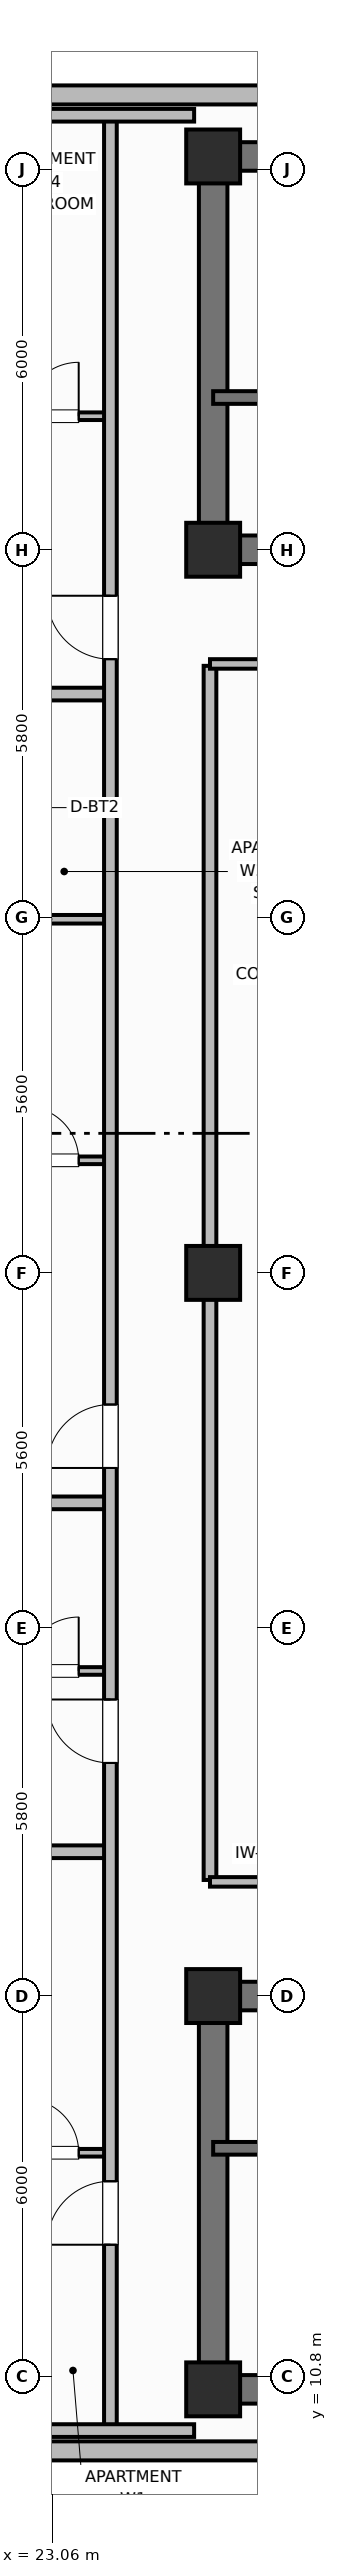
"""IFC4 building model, lengths in metres.
Left out: names, types, materials, properties, quantities, classifications, styles, units other than length and angle.
Written with IfcOpenShell. Run it as: python <this file> out.ifc"""

import sys

from ifc_helpers import new_model, si_unit, direction, frame, frame_2d, origin, origin_2d, place, context, subcontext, project, spatial, rectangle, extrude, element, fill, save


model = new_model("IFC4")
c1 = context("Model", 3, precision=1e-05, world=origin(), true_north=direction((0.0, 1.0)))
c2 = subcontext(c1, "Body", "Model", "MODEL_VIEW")
j1 = project(units=[si_unit("LENGTHUNIT", "METRE"), si_unit("PLANEANGLEUNIT", "RADIAN")], contexts=[c1])
p1 = place(None, origin())
s1 = spatial("IfcSite", under=j1, at=p1, CompositionType="ELEMENT")
p2 = place(p1, origin())
s2 = spatial("IfcBuilding", under=s1, at=p2, CompositionType="ELEMENT")
p3 = place(p2, frame((0.0, 0.0, 229.5)))
s3 = spatial("IfcBuildingStorey", under=s2, at=p3, CompositionType="ELEMENT", Elevation=229.5)
p4 = place(p3, frame((52.8, 10.6, 0.0), z_axis=(0.0, 0.0, 1.0), x_axis=(-1.0, 0.0, 0.0)))
e1 = element("IfcWall", 1, at=p4, inside=s3, PredefinedType="SHEAR", context=c2, shape_type="SweptSolid", body=[
    extrude(rectangle(XDim=27.2, YDim=0.45, at=frame_2d((13.6, 0.0))), origin(), (0.0, 0.0, 1.0), 3.7),
])
p5 = place(p3, frame((25.6, 10.825, 0.0), z_axis=(0.0, 0.0, 1.0), x_axis=(0.0, 1.0, 0.0)))
e2 = element("IfcWall", 2, at=p5, inside=s3, PredefinedType="SHEAR", context=c2, shape_type="SweptSolid", body=[
    extrude(rectangle(XDim=5.75, YDim=0.45, at=frame_2d((2.875, 0.0))), origin(), (0.0, 0.0, 1.0), 3.7),
])
p6 = place(p3, frame((25.6, 16.8, 0.0), z_axis=(0.0, 0.0, 1.0), x_axis=(1.0, 0.0, 0.0)))
e3 = element("IfcWall", 3, at=p6, inside=s3, PredefinedType="SHEAR", context=c2, shape_type="SweptSolid", body=[
    extrude(rectangle(XDim=27.2, YDim=0.45, at=frame_2d((13.6, 0.0))), origin(), (0.0, 0.0, 1.0), 3.7),
])
p7 = place(p6, frame((1.9, 0.0, 0.0)))
e4 = element("IfcOpeningElement", 4, at=p7, cuts=e3, PredefinedType="OPENING", context=c2, shape_type="SweptSolid", body=[
    extrude(rectangle(XDim=1.1, YDim=2.15, at=frame_2d((0.55, 1.075))), frame((0.0, 0.235, 0.0), z_axis=(0.0, -1.0, 0.0), x_axis=(1.0, 0.0, 0.0)), (0.0, 0.0, 1.0), 0.47),
])
p8 = place(p6, frame((13.0, 0.0, 0.0)))
e5 = element("IfcOpeningElement", 5, at=p8, cuts=e3, PredefinedType="OPENING", context=c2, shape_type="SweptSolid", body=[
    extrude(rectangle(XDim=1.2, YDim=2.15, at=frame_2d((0.6, 1.075))), frame((0.0, 0.235, 0.0), z_axis=(0.0, -1.0, 0.0), x_axis=(1.0, 0.0, 0.0)), (0.0, 0.0, 1.0), 0.47),
])
p9 = place(p6, frame((21.6, 0.0, 0.0)))
e6 = element("IfcOpeningElement", 6, at=p9, cuts=e3, PredefinedType="OPENING", context=c2, shape_type="SweptSolid", body=[
    extrude(rectangle(XDim=1.0, YDim=2.15, at=frame_2d((0.5, 1.075))), frame((0.0, 0.235, 0.0), z_axis=(0.0, -1.0, 0.0), x_axis=(1.0, 0.0, 0.0)), (0.0, 0.0, 1.0), 0.47),
])
p10 = place(p3, frame((25.6, 45.8, 0.0), z_axis=(0.0, 0.0, 1.0), x_axis=(1.0, 0.0, 0.0)))
e7 = element("IfcWall", 7, at=p10, inside=s3, PredefinedType="SHEAR", context=c2, shape_type="SweptSolid", body=[
    extrude(rectangle(XDim=27.2, YDim=0.45, at=frame_2d((13.6, 0.0))), origin(), (0.0, 0.0, 1.0), 3.7),
])
p11 = place(p3, frame((25.6, 39.825, 0.0), z_axis=(0.0, 0.0, 1.0), x_axis=(0.0, 1.0, 0.0)))
e8 = element("IfcWall", 8, at=p11, inside=s3, PredefinedType="SHEAR", context=c2, shape_type="SweptSolid", body=[
    extrude(rectangle(XDim=5.75, YDim=0.45, at=frame_2d((2.875, 0.0))), origin(), (0.0, 0.0, 1.0), 3.7),
])
p12 = place(p3, frame((52.8, 39.6, 0.0), z_axis=(0.0, 0.0, 1.0), x_axis=(-1.0, 0.0, 0.0)))
e9 = element("IfcWall", 9, at=p12, inside=s3, PredefinedType="SHEAR", context=c2, shape_type="SweptSolid", body=[
    extrude(rectangle(XDim=27.2, YDim=0.45, at=frame_2d((13.6, 0.0))), origin(), (0.0, 0.0, 1.0), 3.7),
])
p13 = place(p12, frame((24.2, 0.0, 0.0)))
e10 = element("IfcOpeningElement", 10, at=p13, cuts=e9, PredefinedType="OPENING", context=c2, shape_type="SweptSolid", body=[
    extrude(rectangle(XDim=1.1, YDim=2.15, at=frame_2d((0.55, 1.075))), frame((0.0, 0.235, 0.0), z_axis=(0.0, -1.0, 0.0), x_axis=(1.0, 0.0, 0.0)), (0.0, 0.0, 1.0), 0.47),
])
p14 = place(p12, frame((15.1, 0.0, 0.0)))
e11 = element("IfcOpeningElement", 11, at=p14, cuts=e9, PredefinedType="OPENING", context=c2, shape_type="SweptSolid", body=[
    extrude(rectangle(XDim=1.2, YDim=2.15, at=frame_2d((0.6, 1.075))), frame((0.0, 0.235, 0.0), z_axis=(0.0, -1.0, 0.0), x_axis=(1.0, 0.0, 0.0)), (0.0, 0.0, 1.0), 0.47),
])
p15 = place(p12, frame((11.6, 0.0, 0.0)))
e12 = element("IfcOpeningElement", 12, at=p15, cuts=e9, PredefinedType="OPENING", context=c2, shape_type="SweptSolid", body=[
    extrude(rectangle(XDim=0.9, YDim=2.1, at=frame_2d((0.45, 1.05))), frame((0.0, 0.235, 0.0), z_axis=(0.0, -1.0, 0.0), x_axis=(1.0, 0.0, 0.0)), (0.0, 0.0, 1.0), 0.47),
])
p16 = place(p12, frame((7.35, 0.0, 0.0)))
e13 = element("IfcOpeningElement", 13, at=p16, cuts=e9, PredefinedType="OPENING", context=c2, shape_type="SweptSolid", body=[
    extrude(rectangle(XDim=0.85, YDim=2.1, at=frame_2d((0.425, 1.05))), frame((0.0, 0.235, 0.0), z_axis=(0.0, -1.0, 0.0), x_axis=(1.0, 0.0, 0.0)), (0.0, 0.0, 1.0), 0.47),
])
p17 = place(p12, frame((4.2, 0.0, 0.0)))
e14 = element("IfcOpeningElement", 14, at=p17, cuts=e9, PredefinedType="OPENING", context=c2, shape_type="SweptSolid", body=[
    extrude(rectangle(XDim=1.3, YDim=2.2, at=frame_2d((0.65, 1.1))), frame((0.0, 0.235, 0.0), z_axis=(0.0, -1.0, 0.0), x_axis=(1.0, 0.0, 0.0)), (0.0, 0.0, 1.0), 0.47),
])
for number, where, z_axis, x_axis in (
    (15, (25.6, 10.6, 0.0), (0.0, 0.0, 1.0), (1.0, 0.0, 0.0)),
    (16, (25.6, 16.8, 0.0), (0.0, 0.0, 1.0), (1.0, 0.0, 0.0)),
    (17, (25.6, 39.6, 0.0), (0.0, 0.0, 1.0), (1.0, 0.0, 0.0)),
    (18, (25.6, 45.8, 0.0), (0.0, 0.0, 1.0), (1.0, 0.0, 0.0)),
    (19, (25.6, 28.2, 0.0), (0.0, 0.0, 1.0), (1.0, 0.0, 0.0)),
):
    element("IfcColumn", number, at=place(p3, frame(where, z_axis=z_axis, x_axis=x_axis)), inside=s3, PredefinedType="COLUMN", context=c2, shape_type="SweptSolid", body=[
        extrude(rectangle(XDim=0.85, YDim=0.85, at=origin_2d()), origin(), (0.0, 0.0, 1.0), 3.7),
    ])
p18 = place(p3, frame((22.56, 9.63, 0.0), z_axis=(0.0, 0.0, 1.0), x_axis=(1.0, 0.0, 0.0)))
e20 = element("IfcWall", 20, at=p18, inside=s3, PredefinedType="SOLIDWALL", context=c2, shape_type="SweptSolid", body=[
    extrude(rectangle(XDim=33.28, YDim=0.3, at=frame_2d((16.64, 0.0))), origin(), (0.0, 0.0, 1.0), 2.73),
])
p19 = place(p18, frame((4.747, 0.0, 0.76)))
e21 = element("IfcOpeningElement", 21, at=p19, cuts=e20, PredefinedType="OPENING", context=c2, shape_type="SweptSolid", body=[
    extrude(rectangle(XDim=1.4, YDim=1.85, at=frame_2d((0.7, 0.925))), frame((0.0, 0.16, 0.0), z_axis=(0.0, -1.0, 0.0), x_axis=(1.0, 0.0, 0.0)), (0.0, 0.0, 1.0), 0.32),
])
p20 = place(p18, frame((7.945, 0.0, 0.76)))
e22 = element("IfcOpeningElement", 22, at=p20, cuts=e20, PredefinedType="OPENING", context=c2, shape_type="SweptSolid", body=[
    extrude(rectangle(XDim=1.4, YDim=1.85, at=frame_2d((0.7, 0.925))), frame((0.0, 0.16, 0.0), z_axis=(0.0, -1.0, 0.0), x_axis=(1.0, 0.0, 0.0)), (0.0, 0.0, 1.0), 0.32),
])
p21 = place(p18, frame((14.341, 0.0, 0.76)))
e23 = element("IfcOpeningElement", 23, at=p21, cuts=e20, PredefinedType="OPENING", context=c2, shape_type="SweptSolid", body=[
    extrude(rectangle(XDim=1.4, YDim=1.85, at=frame_2d((0.7, 0.925))), frame((0.0, 0.16, 0.0), z_axis=(0.0, -1.0, 0.0), x_axis=(1.0, 0.0, 0.0)), (0.0, 0.0, 1.0), 0.32),
])
p22 = place(p18, frame((17.539, 0.0, 0.76)))
e24 = element("IfcOpeningElement", 24, at=p22, cuts=e20, PredefinedType="OPENING", context=c2, shape_type="SweptSolid", body=[
    extrude(rectangle(XDim=1.4, YDim=1.85, at=frame_2d((0.7, 0.925))), frame((0.0, 0.16, 0.0), z_axis=(0.0, -1.0, 0.0), x_axis=(1.0, 0.0, 0.0)), (0.0, 0.0, 1.0), 0.32),
])
p23 = place(p18, frame((23.935, 0.0, 0.76)))
e25 = element("IfcOpeningElement", 25, at=p23, cuts=e20, PredefinedType="OPENING", context=c2, shape_type="SweptSolid", body=[
    extrude(rectangle(XDim=1.4, YDim=1.85, at=frame_2d((0.7, 0.925))), frame((0.0, 0.16, 0.0), z_axis=(0.0, -1.0, 0.0), x_axis=(1.0, 0.0, 0.0)), (0.0, 0.0, 1.0), 0.32),
])
p24 = place(p18, frame((27.133, 0.0, 0.76)))
e26 = element("IfcOpeningElement", 26, at=p24, cuts=e20, PredefinedType="OPENING", context=c2, shape_type="SweptSolid", body=[
    extrude(rectangle(XDim=1.4, YDim=1.85, at=frame_2d((0.7, 0.925))), frame((0.0, 0.16, 0.0), z_axis=(0.0, -1.0, 0.0), x_axis=(1.0, 0.0, 0.0)), (0.0, 0.0, 1.0), 0.32),
])
p25 = place(p3, frame((55.84, 46.77, 0.0), z_axis=(0.0, 0.0, 1.0), x_axis=(-1.0, 0.0, 0.0)))
e27 = element("IfcWall", 27, at=p25, inside=s3, PredefinedType="SOLIDWALL", context=c2, shape_type="SweptSolid", body=[
    extrude(rectangle(XDim=33.28, YDim=0.3, at=frame_2d((16.64, 0.0))), origin(), (0.0, 0.0, 1.0), 2.73),
])
p26 = place(p25, frame((5.08, 0.0, 0.76)))
e28 = element("IfcOpeningElement", 28, at=p26, cuts=e27, PredefinedType="OPENING", context=c2, shape_type="SweptSolid", body=[
    extrude(rectangle(XDim=1.8, YDim=1.85, at=frame_2d((0.9, 0.925))), frame((0.0, 0.16, 0.0), z_axis=(0.0, -1.0, 0.0), x_axis=(1.0, 0.0, 0.0)), (0.0, 0.0, 1.0), 0.32),
])
p27 = place(p25, frame((8.633, 0.0, 0.76)))
e29 = element("IfcOpeningElement", 29, at=p27, cuts=e27, PredefinedType="OPENING", context=c2, shape_type="SweptSolid", body=[
    extrude(rectangle(XDim=1.8, YDim=1.85, at=frame_2d((0.9, 0.925))), frame((0.0, 0.16, 0.0), z_axis=(0.0, -1.0, 0.0), x_axis=(1.0, 0.0, 0.0)), (0.0, 0.0, 1.0), 0.32),
])
p28 = place(p25, frame((15.74, 0.0, 0.76)))
e30 = element("IfcOpeningElement", 30, at=p28, cuts=e27, PredefinedType="OPENING", context=c2, shape_type="SweptSolid", body=[
    extrude(rectangle(XDim=1.8, YDim=1.85, at=frame_2d((0.9, 0.925))), frame((0.0, 0.16, 0.0), z_axis=(0.0, -1.0, 0.0), x_axis=(1.0, 0.0, 0.0)), (0.0, 0.0, 1.0), 0.32),
])
p29 = place(p25, frame((22.847, 0.0, 0.76)))
e31 = element("IfcOpeningElement", 31, at=p29, cuts=e27, PredefinedType="OPENING", context=c2, shape_type="SweptSolid", body=[
    extrude(rectangle(XDim=1.8, YDim=1.85, at=frame_2d((0.9, 0.925))), frame((0.0, 0.16, 0.0), z_axis=(0.0, -1.0, 0.0), x_axis=(1.0, 0.0, 0.0)), (0.0, 0.0, 1.0), 0.32),
])
p30 = place(p25, frame((26.4, 0.0, 0.76)))
e32 = element("IfcOpeningElement", 32, at=p30, cuts=e27, PredefinedType="OPENING", context=c2, shape_type="SweptSolid", body=[
    extrude(rectangle(XDim=1.8, YDim=1.85, at=frame_2d((0.9, 0.925))), frame((0.0, 0.16, 0.0), z_axis=(0.0, -1.0, 0.0), x_axis=(1.0, 0.0, 0.0)), (0.0, 0.0, 1.0), 0.32),
])
p31 = place(p3, frame((25.6, 14.4, 0.0), z_axis=(0.0, 0.0, 1.0), x_axis=(1.0, 0.0, 0.0)))
e33 = element("IfcWall", 33, at=p31, inside=s3, PredefinedType="SHEAR", context=c2, shape_type="SweptSolid", body=[
    extrude(rectangle(XDim=9.55, YDim=0.2, at=frame_2d((4.775, 0.0))), origin(), (0.0, 0.0, 1.0), 3.7),
])
p32 = place(p31, frame((1.05, 0.0, 0.0)))
e34 = element("IfcOpeningElement", 34, at=p32, cuts=e33, PredefinedType="OPENING", context=c2, shape_type="SweptSolid", body=[
    extrude(rectangle(XDim=1.1, YDim=2.15, at=frame_2d((0.55, 1.075))), frame((0.0, 0.11, 0.0), z_axis=(0.0, -1.0, 0.0), x_axis=(1.0, 0.0, 0.0)), (0.0, 0.0, 1.0), 0.22),
])
p33 = place(p3, frame((35.15, 42.0, 0.0), z_axis=(0.0, 0.0, 1.0), x_axis=(-1.0, 0.0, 0.0)))
e35 = element("IfcWall", 35, at=p33, inside=s3, PredefinedType="SHEAR", context=c2, shape_type="SweptSolid", body=[
    extrude(rectangle(XDim=9.55, YDim=0.2, at=frame_2d((4.775, 0.0))), origin(), (0.0, 0.0, 1.0), 3.7),
])
p34 = place(p33, frame((7.25, 0.0, 0.0)))
e36 = element("IfcOpeningElement", 36, at=p34, cuts=e35, PredefinedType="OPENING", context=c2, shape_type="SweptSolid", body=[
    extrude(rectangle(XDim=1.1, YDim=2.15, at=frame_2d((0.55, 1.075))), frame((0.0, 0.11, 0.0), z_axis=(0.0, -1.0, 0.0), x_axis=(1.0, 0.0, 0.0)), (0.0, 0.0, 1.0), 0.22),
])
p35 = place(p3, frame((25.55, 18.63, 0.0), z_axis=(0.0, 0.0, 1.0), x_axis=(0.0, 1.0, 0.0)))
e37 = element("IfcWall", 37, at=p35, inside=s3, PredefinedType="PARTITIONING", context=c2, shape_type="SweptSolid", body=[
    extrude(rectangle(XDim=19.14, YDim=0.2, at=frame_2d((9.57, 0.0))), origin(), (0.0, 0.0, 1.0), 2.56),
])
for number, where, z_axis, x_axis in (
    (38, (25.55, 18.6, 0.0), (0.0, 0.0, 1.0), (1.0, 0.0, 0.0)),
    (39, (25.55, 37.8, 0.0), (0.0, 0.0, 1.0), (1.0, 0.0, 0.0)),
):
    element("IfcWall", number, at=place(p3, frame(where, z_axis=z_axis, x_axis=x_axis)), inside=s3, PredefinedType="PARTITIONING", context=c2, shape_type="SweptSolid", body=[
        extrude(rectangle(XDim=3.5, YDim=0.15, at=frame_2d((1.75, 0.0))), origin(), (0.0, 0.0, 1.0), 2.56),
    ])
p36 = place(p3, frame((22.03, 14.33, 0.0), z_axis=(0.0, 0.0, 1.0), x_axis=(1.0, 0.0, 0.0)))
e40 = element("IfcWall", 40, at=p36, inside=s3, PredefinedType="PARTITIONING", context=c2, shape_type="SweptSolid", body=[
    extrude(rectangle(XDim=1.95, YDim=0.12, at=frame_2d((0.975, 0.0))), origin(), (0.0, 0.0, 1.0), 2.56),
])
p37 = place(p36, frame((0.6, 0.0, 0.0)))
e41 = element("IfcOpeningElement", 41, at=p37, cuts=e40, PredefinedType="OPENING", context=c2, shape_type="SweptSolid", body=[
    extrude(rectangle(XDim=0.85, YDim=2.1, at=frame_2d((0.425, 1.05))), frame((0.0, 0.07, 0.0), z_axis=(0.0, -1.0, 0.0), x_axis=(1.0, 0.0, 0.0)), (0.0, 0.0, 1.0), 0.14),
])
p38 = place(p3, frame((19.53, 19.075, 0.0), z_axis=(0.0, 0.0, 1.0), x_axis=(1.0, 0.0, 0.0)))
e42 = element("IfcWall", 42, at=p38, inside=s3, PredefinedType="PARTITIONING", context=c2, shape_type="SweptSolid", body=[
    extrude(rectangle(XDim=4.45, YDim=0.2, at=frame_2d((2.225, 0.0))), origin(), (0.0, 0.0, 1.0), 2.56),
])
p39 = place(p3, frame((22.03, 21.925, 0.0), z_axis=(0.0, 0.0, 1.0), x_axis=(1.0, 0.0, 0.0)))
e43 = element("IfcWall", 43, at=p39, inside=s3, PredefinedType="PARTITIONING", context=c2, shape_type="SweptSolid", body=[
    extrude(rectangle(XDim=1.95, YDim=0.12, at=frame_2d((0.975, 0.0))), origin(), (0.0, 0.0, 1.0), 2.56),
])
p40 = place(p39, frame((0.6, 0.0, 0.0)))
e44 = element("IfcOpeningElement", 44, at=p40, cuts=e43, PredefinedType="OPENING", context=c2, shape_type="SweptSolid", body=[
    extrude(rectangle(XDim=0.85, YDim=2.1, at=frame_2d((0.425, 1.05))), frame((0.0, 0.07, 0.0), z_axis=(0.0, -1.0, 0.0), x_axis=(1.0, 0.0, 0.0)), (0.0, 0.0, 1.0), 0.14),
])
p41 = place(p3, frame((19.829, 24.575, 0.0), z_axis=(0.0, 0.0, 1.0), x_axis=(1.0, 0.0, 0.0)))
e45 = element("IfcWall", 45, at=p41, inside=s3, PredefinedType="PARTITIONING", context=c2, shape_type="SweptSolid", body=[
    extrude(rectangle(XDim=4.151, YDim=0.2, at=frame_2d((2.075, 0.0))), origin(), (0.0, 0.0, 1.0), 2.56),
])
p42 = place(p3, frame((22.03, 29.975, 0.0), z_axis=(0.0, 0.0, 1.0), x_axis=(1.0, 0.0, 0.0)))
e46 = element("IfcWall", 46, at=p42, inside=s3, PredefinedType="PARTITIONING", context=c2, shape_type="SweptSolid", body=[
    extrude(rectangle(XDim=1.95, YDim=0.12, at=frame_2d((0.975, 0.0))), origin(), (0.0, 0.0, 1.0), 2.56),
])
p43 = place(p42, frame((0.6, 0.0, 0.0)))
e47 = element("IfcOpeningElement", 47, at=p43, cuts=e46, PredefinedType="OPENING", context=c2, shape_type="SweptSolid", body=[
    extrude(rectangle(XDim=0.85, YDim=2.1, at=frame_2d((0.425, 1.05))), frame((0.0, 0.07, 0.0), z_axis=(0.0, -1.0, 0.0), x_axis=(1.0, 0.0, 0.0)), (0.0, 0.0, 1.0), 0.14),
])
p44 = place(p3, frame((22.03, 33.775, 0.0), z_axis=(0.0, 0.0, 1.0), x_axis=(1.0, 0.0, 0.0)))
e48 = element("IfcWall", 48, at=p44, inside=s3, PredefinedType="PARTITIONING", context=c2, shape_type="SweptSolid", body=[
    extrude(rectangle(XDim=1.95, YDim=0.135, at=frame_2d((0.975, 0.0))), origin(), (0.0, 0.0, 1.0), 2.56),
])
p45 = place(p3, frame((19.53, 37.325, 0.0), z_axis=(0.0, 0.0, 1.0), x_axis=(1.0, 0.0, 0.0)))
e49 = element("IfcWall", 49, at=p45, inside=s3, PredefinedType="PARTITIONING", context=c2, shape_type="SweptSolid", body=[
    extrude(rectangle(XDim=4.45, YDim=0.2, at=frame_2d((2.225, 0.0))), origin(), (0.0, 0.0, 1.0), 2.56),
])
p46 = place(p3, frame((22.03, 41.705, 0.0), z_axis=(0.0, 0.0, 1.0), x_axis=(1.0, 0.0, 0.0)))
e50 = element("IfcWall", 50, at=p46, inside=s3, PredefinedType="PARTITIONING", context=c2, shape_type="SweptSolid", body=[
    extrude(rectangle(XDim=1.95, YDim=0.12, at=frame_2d((0.975, 0.0))), origin(), (0.0, 0.0, 1.0), 2.56),
])
p47 = place(p46, frame((0.6, 0.0, 0.0)))
e51 = element("IfcOpeningElement", 51, at=p47, cuts=e50, PredefinedType="OPENING", context=c2, shape_type="SweptSolid", body=[
    extrude(rectangle(XDim=0.85, YDim=2.1, at=frame_2d((0.425, 1.05))), frame((0.0, 0.07, 0.0), z_axis=(0.0, -1.0, 0.0), x_axis=(1.0, 0.0, 0.0)), (0.0, 0.0, 1.0), 0.14),
])
p48 = place(p3, frame((23.98, 9.95, 0.0), z_axis=(0.0, 0.0, 1.0), x_axis=(0.0, 1.0, 0.0)))
e52 = element("IfcWall", 52, at=p48, inside=s3, PredefinedType="PARTITIONING", context=c2, shape_type="SweptSolid", body=[
    extrude(rectangle(XDim=36.5, YDim=0.2, at=frame_2d((18.25, 0.0))), origin(), (0.0, 0.0, 1.0), 2.56),
])
p49 = place(p48, frame((2.93, 0.0, 0.0)))
e53 = element("IfcOpeningElement", 53, at=p49, cuts=e52, PredefinedType="OPENING", context=c2, shape_type="SweptSolid", body=[
    extrude(rectangle(XDim=1.0, YDim=2.15, at=frame_2d((0.5, 1.075))), frame((0.0, 0.11, 0.0), z_axis=(0.0, -1.0, 0.0), x_axis=(1.0, 0.0, 0.0)), (0.0, 0.0, 1.0), 0.22),
])
p50 = place(p48, frame((10.525, 0.0, 0.0)))
e54 = element("IfcOpeningElement", 54, at=p50, cuts=e52, PredefinedType="OPENING", context=c2, shape_type="SweptSolid", body=[
    extrude(rectangle(XDim=1.0, YDim=2.15, at=frame_2d((0.5, 1.075))), frame((0.0, 0.11, 0.0), z_axis=(0.0, -1.0, 0.0), x_axis=(1.0, 0.0, 0.0)), (0.0, 0.0, 1.0), 0.22),
])
p51 = place(p48, frame((15.175, 0.0, 0.0)))
e55 = element("IfcOpeningElement", 55, at=p51, cuts=e52, PredefinedType="OPENING", context=c2, shape_type="SweptSolid", body=[
    extrude(rectangle(XDim=1.0, YDim=2.15, at=frame_2d((0.5, 1.075))), frame((0.0, 0.11, 0.0), z_axis=(0.0, -1.0, 0.0), x_axis=(1.0, 0.0, 0.0)), (0.0, 0.0, 1.0), 0.22),
])
p52 = place(p48, frame((27.925, 0.0, 0.0)))
e56 = element("IfcOpeningElement", 56, at=p52, cuts=e52, PredefinedType="OPENING", context=c2, shape_type="SweptSolid", body=[
    extrude(rectangle(XDim=1.0, YDim=2.15, at=frame_2d((0.5, 1.075))), frame((0.0, 0.11, 0.0), z_axis=(0.0, -1.0, 0.0), x_axis=(1.0, 0.0, 0.0)), (0.0, 0.0, 1.0), 0.22),
])
for number, where, z_axis, x_axis in (
    (57, (21.546, 9.95, 0.0), (0.0, 0.0, 1.0), (1.0, 0.0, 0.0)),
    (58, (21.546, 46.45, 0.0), (0.0, 0.0, 1.0), (1.0, 0.0, 0.0)),
):
    element("IfcWall", number, at=place(p3, frame(where, z_axis=z_axis, x_axis=x_axis)), inside=s3, PredefinedType="PARTITIONING", context=c2, shape_type="SweptSolid", body=[
        extrude(rectangle(XDim=3.754, YDim=0.2, at=frame_2d((1.877, 0.0))), origin(), (0.0, 0.0, 1.0), 2.56),
    ])
p53 = place(p37, origin())
e59 = element("IfcDoor", 59, at=p53, inside=s3, OperationType="SINGLE_SWING_LEFT", PredefinedType="DOOR", context=c2, shape_type="SweptSolid", body=[
    extrude(rectangle(XDim=0.85, YDim=2.1, at=frame_2d((0.425, 1.05))), frame((0.0, 0.025, 0.0), z_axis=(0.0, -1.0, 0.0), x_axis=(1.0, 0.0, 0.0)), (0.0, 0.0, 1.0), 0.05),
])
fill(e41, e59)
p54 = place(p40, origin())
e60 = element("IfcDoor", 60, at=p54, inside=s3, OperationType="SINGLE_SWING_RIGHT", PredefinedType="DOOR", context=c2, shape_type="SweptSolid", body=[
    extrude(rectangle(XDim=0.85, YDim=2.1, at=frame_2d((0.425, 1.05))), frame((0.0, 0.025, 0.0), z_axis=(0.0, -1.0, 0.0), x_axis=(1.0, 0.0, 0.0)), (0.0, 0.0, 1.0), 0.05),
])
fill(e44, e60)
p55 = place(p43, origin())
e61 = element("IfcDoor", 61, at=p55, inside=s3, OperationType="SINGLE_SWING_LEFT", PredefinedType="DOOR", context=c2, shape_type="SweptSolid", body=[
    extrude(rectangle(XDim=0.85, YDim=2.1, at=frame_2d((0.425, 1.05))), frame((0.0, 0.025, 0.0), z_axis=(0.0, -1.0, 0.0), x_axis=(1.0, 0.0, 0.0)), (0.0, 0.0, 1.0), 0.05),
])
fill(e47, e61)
p56 = place(p47, origin())
e62 = element("IfcDoor", 62, at=p56, inside=s3, OperationType="SINGLE_SWING_RIGHT", PredefinedType="DOOR", context=c2, shape_type="SweptSolid", body=[
    extrude(rectangle(XDim=0.85, YDim=2.1, at=frame_2d((0.425, 1.05))), frame((0.0, 0.025, 0.0), z_axis=(0.0, -1.0, 0.0), x_axis=(1.0, 0.0, 0.0)), (0.0, 0.0, 1.0), 0.05),
])
fill(e51, e62)
p57 = place(p49, origin())
e63 = element("IfcDoor", 63, at=p57, inside=s3, OperationType="SINGLE_SWING_LEFT", PredefinedType="DOOR", context=c2, shape_type="SweptSolid", body=[
    extrude(rectangle(XDim=1.0, YDim=2.15, at=frame_2d((0.5, 1.075))), frame((0.0, 0.025, 0.0), z_axis=(0.0, -1.0, 0.0), x_axis=(1.0, 0.0, 0.0)), (0.0, 0.0, 1.0), 0.05),
])
fill(e53, e63)
p58 = place(p50, origin())
e64 = element("IfcDoor", 64, at=p58, inside=s3, OperationType="SINGLE_SWING_RIGHT", PredefinedType="DOOR", context=c2, shape_type="SweptSolid", body=[
    extrude(rectangle(XDim=1.0, YDim=2.15, at=frame_2d((0.5, 1.075))), frame((0.0, 0.025, 0.0), z_axis=(0.0, -1.0, 0.0), x_axis=(1.0, 0.0, 0.0)), (0.0, 0.0, 1.0), 0.05),
])
fill(e54, e64)
p59 = place(p51, origin())
e65 = element("IfcDoor", 65, at=p59, inside=s3, OperationType="SINGLE_SWING_LEFT", PredefinedType="DOOR", context=c2, shape_type="SweptSolid", body=[
    extrude(rectangle(XDim=1.0, YDim=2.15, at=frame_2d((0.5, 1.075))), frame((0.0, 0.025, 0.0), z_axis=(0.0, -1.0, 0.0), x_axis=(1.0, 0.0, 0.0)), (0.0, 0.0, 1.0), 0.05),
])
fill(e55, e65)
p60 = place(p52, origin())
e66 = element("IfcDoor", 66, at=p60, inside=s3, OperationType="SINGLE_SWING_RIGHT", PredefinedType="DOOR", context=c2, shape_type="SweptSolid", body=[
    extrude(rectangle(XDim=1.0, YDim=2.15, at=frame_2d((0.5, 1.075))), frame((0.0, 0.025, 0.0), z_axis=(0.0, -1.0, 0.0), x_axis=(1.0, 0.0, 0.0)), (0.0, 0.0, 1.0), 0.05),
])
fill(e56, e66)
save(model, sys.argv[1])
